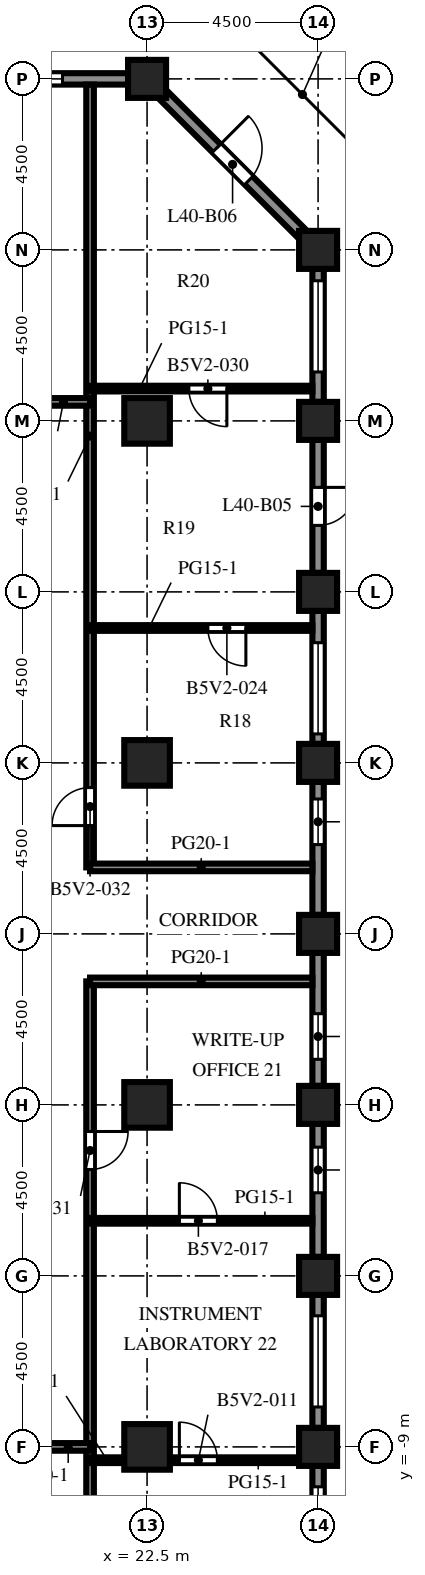
"""IFC4 building model, lengths in metres.
Left out: names, types, materials, properties, quantities, classifications, styles, units other than length and angle.
Written with IfcOpenShell. Run it as: python <this file> out.ifc"""

import sys

from ifc_helpers import new_model, si_unit, direction, frame, frame_2d, origin, origin_2d, place, context, subcontext, project, spatial, rectangle, extrude, element, fill, save


model = new_model("IFC4")
c1 = context("Model", 3, precision=1e-05, world=origin(), true_north=direction((0.0, 1.0)))
c2 = subcontext(c1, "Body", "Model", "MODEL_VIEW")
j1 = project(units=[si_unit("LENGTHUNIT", "METRE"), si_unit("PLANEANGLEUNIT", "RADIAN")], contexts=[c1])
p1 = place(None, origin())
s1 = spatial("IfcSite", under=j1, at=p1, CompositionType="ELEMENT")
p2 = place(p1, origin())
s2 = spatial("IfcBuilding", under=s1, at=p2, CompositionType="ELEMENT")
p3 = place(p2, frame((0.0, 0.0, 177.3)))
s3 = spatial("IfcBuildingStorey", under=s2, at=p3, CompositionType="ELEMENT", Elevation=177.3)
for number, where, z_axis, x_axis in (
    (1, (22.5, 27.0, 0.0), (0.0, 0.0, 1.0), (1.0, 0.0, 0.0)),
    (2, (27.0, -9.0, 0.0), (0.0, 0.0, 1.0), (1.0, 0.0, 0.0)),
    (3, (27.0, -4.5, 0.0), (0.0, 0.0, 1.0), (1.0, 0.0, 0.0)),
    (4, (27.0, 0.0, 0.0), (0.0, 0.0, 1.0), (1.0, 0.0, 0.0)),
    (5, (27.0, 4.5, 0.0), (0.0, 0.0, 1.0), (1.0, 0.0, 0.0)),
    (6, (27.0, 9.0, 0.0), (0.0, 0.0, 1.0), (1.0, 0.0, 0.0)),
    (7, (27.0, 13.5, 0.0), (0.0, 0.0, 1.0), (1.0, 0.0, 0.0)),
    (8, (27.0, 18.0, 0.0), (0.0, 0.0, 1.0), (1.0, 0.0, 0.0)),
    (9, (27.0, 22.5, 0.0), (0.0, 0.0, 1.0), (1.0, 0.0, 0.0)),
):
    element("IfcColumn", number, at=place(p3, frame(where, z_axis=z_axis, x_axis=x_axis)), inside=s3, PredefinedType="COLUMN", context=c2, shape_type="SweptSolid", body=[
        extrude(rectangle(XDim=1.0, YDim=1.0, at=origin_2d()), origin(), (0.0, 0.0, 1.0), 4.1),
    ])
for number, where, z_axis, x_axis in (
    (10, (22.5, -9.0, 0.0), (0.0, 0.0, 1.0), (1.0, 0.0, 0.0)),
    (11, (22.5, 0.0, 0.0), (0.0, 0.0, 1.0), (1.0, 0.0, 0.0)),
    (12, (22.5, 9.0, 0.0), (0.0, 0.0, 1.0), (1.0, 0.0, 0.0)),
    (13, (22.5, 18.0, 0.0), (0.0, 0.0, 1.0), (1.0, 0.0, 0.0)),
):
    element("IfcColumn", number, at=place(p3, frame(where, z_axis=z_axis, x_axis=x_axis)), inside=s3, PredefinedType="COLUMN", context=c2, shape_type="SweptSolid", body=[
        extrude(rectangle(XDim=1.2, YDim=1.2, at=origin_2d()), origin(), (0.0, 0.0, 1.0), 4.1),
    ])
p4 = place(p3, frame((27.0, -9.5, 0.0), z_axis=(0.0, 0.0, 1.0), x_axis=(0.0, -1.0, 0.0)))
e14 = element("IfcWall", 14, at=p4, inside=s3, PredefinedType="SOLIDWALL", context=c2, shape_type="SweptSolid", body=[
    extrude(rectangle(XDim=3.5, YDim=0.3, at=frame_2d((1.75, 0.0))), origin(), (0.0, 0.0, 1.0), 2.85),
])
p5 = place(p4, frame((0.55, 0.0, 0.8)))
e15 = element("IfcOpeningElement", 15, at=p5, cuts=e14, PredefinedType="OPENING", context=c2, shape_type="SweptSolid", body=[
    extrude(rectangle(XDim=2.4, YDim=1.7, at=frame_2d((1.2, 0.85))), frame((0.0, 0.16, 0.0), z_axis=(0.0, -1.0, 0.0), x_axis=(1.0, 0.0, 0.0)), (0.0, 0.0, 1.0), 0.32),
])
p6 = place(p3, frame((27.0, -5.0, 0.0), z_axis=(0.0, 0.0, 1.0), x_axis=(0.0, -1.0, 0.0)))
e16 = element("IfcWall", 16, at=p6, inside=s3, PredefinedType="SOLIDWALL", context=c2, shape_type="SweptSolid", body=[
    extrude(rectangle(XDim=3.5, YDim=0.3, at=frame_2d((1.75, 0.0))), origin(), (0.0, 0.0, 1.0), 2.85),
])
p7 = place(p6, frame((0.55, 0.0, 0.8)))
e17 = element("IfcOpeningElement", 17, at=p7, cuts=e16, PredefinedType="OPENING", context=c2, shape_type="SweptSolid", body=[
    extrude(rectangle(XDim=2.4, YDim=1.7, at=frame_2d((1.2, 0.85))), frame((0.0, 0.16, 0.0), z_axis=(0.0, -1.0, 0.0), x_axis=(1.0, 0.0, 0.0)), (0.0, 0.0, 1.0), 0.32),
])
p8 = place(p3, frame((27.0, -0.5, 0.0), z_axis=(0.0, 0.0, 1.0), x_axis=(0.0, -1.0, 0.0)))
e18 = element("IfcWall", 18, at=p8, inside=s3, PredefinedType="SOLIDWALL", context=c2, shape_type="SweptSolid", body=[
    extrude(rectangle(XDim=3.5, YDim=0.3, at=frame_2d((1.75, 0.0))), origin(), (0.0, 0.0, 1.0), 2.85),
])
p9 = place(p8, frame((0.613, 0.0, 0.8)))
e19 = element("IfcOpeningElement", 19, at=p9, cuts=e18, PredefinedType="OPENING", context=c2, shape_type="SweptSolid", body=[
    extrude(rectangle(XDim=1.2, YDim=1.7, at=frame_2d((0.6, 0.85))), frame((0.0, 0.16, 0.0), z_axis=(0.0, -1.0, 0.0), x_axis=(1.0, 0.0, 0.0)), (0.0, 0.0, 1.0), 0.32),
])
p10 = place(p3, frame((27.0, 4.0, 0.0), z_axis=(0.0, 0.0, 1.0), x_axis=(0.0, -1.0, 0.0)))
e20 = element("IfcWall", 20, at=p10, inside=s3, PredefinedType="SOLIDWALL", context=c2, shape_type="SweptSolid", body=[
    extrude(rectangle(XDim=3.5, YDim=0.3, at=frame_2d((1.75, 0.0))), origin(), (0.0, 0.0, 1.0), 2.85),
])
p11 = place(p10, frame((1.6, 0.0, 0.8)))
e21 = element("IfcOpeningElement", 21, at=p11, cuts=e20, PredefinedType="OPENING", context=c2, shape_type="SweptSolid", body=[
    extrude(rectangle(XDim=1.2, YDim=1.7, at=frame_2d((0.6, 0.85))), frame((0.0, 0.16, 0.0), z_axis=(0.0, -1.0, 0.0), x_axis=(1.0, 0.0, 0.0)), (0.0, 0.0, 1.0), 0.32),
])
p12 = place(p3, frame((27.0, 8.5, 0.0), z_axis=(0.0, 0.0, 1.0), x_axis=(0.0, -1.0, 0.0)))
e22 = element("IfcWall", 22, at=p12, inside=s3, PredefinedType="SOLIDWALL", context=c2, shape_type="SweptSolid", body=[
    extrude(rectangle(XDim=3.5, YDim=0.3, at=frame_2d((1.75, 0.0))), origin(), (0.0, 0.0, 1.0), 2.85),
])
p13 = place(p12, frame((0.45, 0.0, 0.8)))
e23 = element("IfcOpeningElement", 23, at=p13, cuts=e22, PredefinedType="OPENING", context=c2, shape_type="SweptSolid", body=[
    extrude(rectangle(XDim=1.2, YDim=1.7, at=frame_2d((0.6, 0.85))), frame((0.0, 0.16, 0.0), z_axis=(0.0, -1.0, 0.0), x_axis=(1.0, 0.0, 0.0)), (0.0, 0.0, 1.0), 0.32),
])
p14 = place(p3, frame((27.0, 13.0, 0.0), z_axis=(0.0, 0.0, 1.0), x_axis=(0.0, -1.0, 0.0)))
e24 = element("IfcWall", 24, at=p14, inside=s3, PredefinedType="SOLIDWALL", context=c2, shape_type="SweptSolid", body=[
    extrude(rectangle(XDim=3.5, YDim=0.3, at=frame_2d((1.75, 0.0))), origin(), (0.0, 0.0, 1.0), 2.85),
])
p15 = place(p14, frame((0.837, 0.0, 0.8)))
e25 = element("IfcOpeningElement", 25, at=p15, cuts=e24, PredefinedType="OPENING", context=c2, shape_type="SweptSolid", body=[
    extrude(rectangle(XDim=2.4, YDim=1.7, at=frame_2d((1.2, 0.85))), frame((0.0, 0.16, 0.0), z_axis=(0.0, -1.0, 0.0), x_axis=(1.0, 0.0, 0.0)), (0.0, 0.0, 1.0), 0.32),
])
p16 = place(p3, frame((27.0, 17.5, 0.0), z_axis=(0.0, 0.0, 1.0), x_axis=(0.0, -1.0, 0.0)))
e26 = element("IfcWall", 26, at=p16, inside=s3, PredefinedType="SOLIDWALL", context=c2, shape_type="SweptSolid", body=[
    extrude(rectangle(XDim=3.5, YDim=0.3, at=frame_2d((1.75, 0.0))), origin(), (0.0, 0.0, 1.0), 2.85),
])
p17 = place(p16, frame((1.25, 0.0, 0.0)))
e27 = element("IfcOpeningElement", 27, at=p17, cuts=e26, PredefinedType="OPENING", context=c2, shape_type="SweptSolid", body=[
    extrude(rectangle(XDim=1.0, YDim=2.2, at=frame_2d((0.5, 1.1))), frame((0.0, 0.16, 0.0), z_axis=(0.0, -1.0, 0.0), x_axis=(1.0, 0.0, 0.0)), (0.0, 0.0, 1.0), 0.32),
])
p18 = place(p3, frame((27.0, 22.0, 0.0), z_axis=(0.0, 0.0, 1.0), x_axis=(0.0, -1.0, 0.0)))
e28 = element("IfcWall", 28, at=p18, inside=s3, PredefinedType="SOLIDWALL", context=c2, shape_type="SweptSolid", body=[
    extrude(rectangle(XDim=3.5, YDim=0.3, at=frame_2d((1.75, 0.0))), origin(), (0.0, 0.0, 1.0), 2.85),
])
p19 = place(p18, frame((0.312, 0.0, 0.8)))
e29 = element("IfcOpeningElement", 29, at=p19, cuts=e28, PredefinedType="OPENING", context=c2, shape_type="SweptSolid", body=[
    extrude(rectangle(XDim=2.4, YDim=1.7, at=frame_2d((1.2, 0.85))), frame((0.0, 0.16, 0.0), z_axis=(0.0, -1.0, 0.0), x_axis=(1.0, 0.0, 0.0)), (0.0, 0.0, 1.0), 0.32),
])
p20 = place(p3, frame((22.894, 26.606, 0.0), z_axis=(0.0, 0.0, 1.0), x_axis=(0.707106781187, -0.707106781187, 0.0)))
e30 = element("IfcWall", 30, at=p20, inside=s3, PredefinedType="SOLIDWALL", context=c2, shape_type="SweptSolid", body=[
    extrude(rectangle(XDim=5.25, YDim=0.3, at=frame_2d((2.625, 0.0))), origin(), (0.0, 0.0, 1.0), 2.85),
])
p21 = place(p20, frame((2.025, 0.0, 0.0)))
e31 = element("IfcOpeningElement", 31, at=p21, cuts=e30, PredefinedType="OPENING", context=c2, shape_type="SweptSolid", body=[
    extrude(rectangle(XDim=1.2, YDim=2.2, at=frame_2d((0.6, 1.1))), frame((0.0, 0.16, 0.0), z_axis=(0.0, -1.0, 0.0), x_axis=(1.0, 0.0, 0.0)), (0.0, 0.0, 1.0), 0.32),
])
p22 = place(p3, frame((18.5, 27.0, 0.0), z_axis=(0.0, 0.0, 1.0), x_axis=(1.0, 0.0, 0.0)))
e32 = element("IfcWall", 32, at=p22, inside=s3, PredefinedType="SOLIDWALL", context=c2, shape_type="SweptSolid", body=[
    extrude(rectangle(XDim=3.5, YDim=0.3, at=frame_2d((1.75, 0.0))), origin(), (0.0, 0.0, 1.0), 2.85),
])
p23 = place(p22, frame((0.575, 0.0, 0.8)))
e33 = element("IfcOpeningElement", 33, at=p23, cuts=e32, PredefinedType="OPENING", context=c2, shape_type="SweptSolid", body=[
    extrude(rectangle(XDim=1.2, YDim=1.7, at=frame_2d((0.6, 0.85))), frame((0.0, 0.16, 0.0), z_axis=(0.0, -1.0, 0.0), x_axis=(1.0, 0.0, 0.0)), (0.0, 0.0, 1.0), 0.32),
])
p24 = place(p3, frame((21.0, 3.25, 0.0), z_axis=(0.0, 0.0, 1.0), x_axis=(0.0, -1.0, 0.0)))
e34 = element("IfcWall", 34, at=p24, inside=s3, PredefinedType="PARTITIONING", context=c2, shape_type="SweptSolid", body=[
    extrude(rectangle(XDim=30.1, YDim=0.2, at=frame_2d((15.05, 0.0))), origin(), (0.0, 0.0, 1.0), 3.65),
])
p25 = place(p24, frame((3.95, 0.0, 0.0)))
e35 = element("IfcOpeningElement", 35, at=p25, cuts=e34, PredefinedType="OPENING", context=c2, shape_type="SweptSolid", body=[
    extrude(rectangle(XDim=1.0, YDim=2.1, at=frame_2d((0.5, 1.05))), frame((0.0, 0.11, 0.0), z_axis=(0.0, -1.0, 0.0), x_axis=(1.0, 0.0, 0.0)), (0.0, 0.0, 1.0), 0.22),
])
p26 = place(p3, frame((21.0, 26.85, 0.0), z_axis=(0.0, 0.0, 1.0), x_axis=(0.0, -1.0, 0.0)))
e36 = element("IfcWall", 36, at=p26, inside=s3, PredefinedType="PARTITIONING", context=c2, shape_type="SweptSolid", body=[
    extrude(rectangle(XDim=20.6, YDim=0.2, at=frame_2d((10.3, 0.0))), origin(), (0.0, 0.0, 1.0), 3.65),
])
p27 = place(p26, frame((18.5, 0.0, 0.0)))
e37 = element("IfcOpeningElement", 37, at=p27, cuts=e36, PredefinedType="OPENING", context=c2, shape_type="SweptSolid", body=[
    extrude(rectangle(XDim=1.0, YDim=2.1, at=frame_2d((0.5, 1.05))), frame((0.0, 0.11, 0.0), z_axis=(0.0, -1.0, 0.0), x_axis=(1.0, 0.0, 0.0)), (0.0, 0.0, 1.0), 0.22),
])
p28 = place(p3, frame((21.0, -9.35, 0.0), z_axis=(0.0, 0.0, 1.0), x_axis=(1.0, 0.0, 0.0)))
e38 = element("IfcWall", 38, at=p28, inside=s3, PredefinedType="PARTITIONING", context=c2, shape_type="SweptSolid", body=[
    extrude(rectangle(XDim=0.9, YDim=0.15, at=frame_2d((0.45, 0.0))), origin(), (0.0, 0.0, 1.0), 3.65),
])
p29 = place(p3, frame((26.5, -9.35, 0.0), z_axis=(0.0, 0.0, 1.0), x_axis=(-1.0, 0.0, 0.0)))
e39 = element("IfcWall", 39, at=p29, inside=s3, PredefinedType="PARTITIONING", context=c2, shape_type="SweptSolid", body=[
    extrude(rectangle(XDim=3.4, YDim=0.15, at=frame_2d((1.7, 0.0))), origin(), (0.0, 0.0, 1.0), 3.65),
])
p30 = place(p29, frame((2.15, 0.0, 0.0)))
e40 = element("IfcOpeningElement", 40, at=p30, cuts=e39, PredefinedType="OPENING", context=c2, shape_type="SweptSolid", body=[
    extrude(rectangle(XDim=1.0, YDim=2.1, at=frame_2d((0.5, 1.05))), frame((0.0, 0.085, 0.0), z_axis=(0.0, -1.0, 0.0), x_axis=(1.0, 0.0, 0.0)), (0.0, 0.0, 1.0), 0.17),
])
p31 = place(p3, frame((21.0, -9.0, 0.0), z_axis=(0.0, 0.0, 1.0), x_axis=(-1.0, 0.0, 0.0)))
e41 = element("IfcWall", 41, at=p31, inside=s3, PredefinedType="PARTITIONING", context=c2, shape_type="SweptSolid", body=[
    extrude(rectangle(XDim=3.0, YDim=0.2, at=frame_2d((1.5, 0.0))), origin(), (0.0, 0.0, 1.0), 3.65),
])
p32 = place(p31, frame((1.15, 0.0, 0.0)))
e42 = element("IfcOpeningElement", 42, at=p32, cuts=e41, PredefinedType="OPENING", context=c2, shape_type="SweptSolid", body=[
    extrude(rectangle(XDim=1.0, YDim=2.1, at=frame_2d((0.5, 1.05))), frame((0.0, 0.11, 0.0), z_axis=(0.0, -1.0, 0.0), x_axis=(1.0, 0.0, 0.0)), (0.0, 0.0, 1.0), 0.22),
])
p33 = place(p3, frame((26.85, -3.05, 0.0), z_axis=(0.0, 0.0, 1.0), x_axis=(-1.0, 0.0, 0.0)))
e43 = element("IfcWall", 43, at=p33, inside=s3, PredefinedType="PARTITIONING", context=c2, shape_type="SweptSolid", body=[
    extrude(rectangle(XDim=5.85, YDim=0.15, at=frame_2d((2.925, 0.0))), origin(), (0.0, 0.0, 1.0), 3.65),
])
p34 = place(p33, frame((2.5, 0.0, 0.0)))
e44 = element("IfcOpeningElement", 44, at=p34, cuts=e43, PredefinedType="OPENING", context=c2, shape_type="SweptSolid", body=[
    extrude(rectangle(XDim=1.0, YDim=2.1, at=frame_2d((0.5, 1.05))), frame((0.0, 0.085, 0.0), z_axis=(0.0, -1.0, 0.0), x_axis=(1.0, 0.0, 0.0)), (0.0, 0.0, 1.0), 0.17),
])
for number, where, z_axis, x_axis in (
    (45, (21.0, 3.25, 0.0), (0.0, 0.0, 1.0), (1.0, 0.0, 0.0)),
    (46, (21.0, 6.25, 0.0), (0.0, 0.0, 1.0), (1.0, 0.0, 0.0)),
):
    element("IfcWall", number, at=place(p3, frame(where, z_axis=z_axis, x_axis=x_axis)), inside=s3, PredefinedType="PARTITIONING", context=c2, shape_type="SweptSolid", body=[
        extrude(rectangle(XDim=5.85, YDim=0.2, at=frame_2d((2.925, 0.0))), origin(), (0.0, 0.0, 1.0), 3.65),
    ])
p35 = place(p3, frame((21.0, 12.55, 0.0), z_axis=(0.0, 0.0, 1.0), x_axis=(1.0, 0.0, 0.0)))
e47 = element("IfcWall", 47, at=p35, inside=s3, PredefinedType="PARTITIONING", context=c2, shape_type="SweptSolid", body=[
    extrude(rectangle(XDim=5.85, YDim=0.15, at=frame_2d((2.925, 0.0))), origin(), (0.0, 0.0, 1.0), 3.65),
])
p36 = place(p35, frame((3.1, 0.0, 0.0)))
e48 = element("IfcOpeningElement", 48, at=p36, cuts=e47, PredefinedType="OPENING", context=c2, shape_type="SweptSolid", body=[
    extrude(rectangle(XDim=1.0, YDim=2.1, at=frame_2d((0.5, 1.05))), frame((0.0, 0.085, 0.0), z_axis=(0.0, -1.0, 0.0), x_axis=(1.0, 0.0, 0.0)), (0.0, 0.0, 1.0), 0.17),
])
p37 = place(p3, frame((18.0, 18.5, 0.0), z_axis=(0.0, 0.0, 1.0), x_axis=(1.0, 0.0, 0.0)))
e49 = element("IfcWall", 49, at=p37, inside=s3, PredefinedType="PARTITIONING", context=c2, shape_type="SweptSolid", body=[
    extrude(rectangle(XDim=3.0, YDim=0.2, at=frame_2d((1.5, 0.0))), origin(), (0.0, 0.0, 1.0), 3.65),
])
p38 = place(p37, frame((0.6, 0.0, 0.0)))
e50 = element("IfcOpeningElement", 50, at=p38, cuts=e49, PredefinedType="OPENING", context=c2, shape_type="SweptSolid", body=[
    extrude(rectangle(XDim=1.0, YDim=2.1, at=frame_2d((0.5, 1.05))), frame((0.0, 0.11, 0.0), z_axis=(0.0, -1.0, 0.0), x_axis=(1.0, 0.0, 0.0)), (0.0, 0.0, 1.0), 0.22),
])
p39 = place(p3, frame((21.0, 18.85, 0.0), z_axis=(0.0, 0.0, 1.0), x_axis=(1.0, 0.0, 0.0)))
e51 = element("IfcWall", 51, at=p39, inside=s3, PredefinedType="PARTITIONING", context=c2, shape_type="SweptSolid", body=[
    extrude(rectangle(XDim=5.85, YDim=0.15, at=frame_2d((2.925, 0.0))), origin(), (0.0, 0.0, 1.0), 3.65),
])
p40 = place(p39, frame((2.6, 0.0, 0.0)))
e52 = element("IfcOpeningElement", 52, at=p40, cuts=e51, PredefinedType="OPENING", context=c2, shape_type="SweptSolid", body=[
    extrude(rectangle(XDim=1.0, YDim=2.1, at=frame_2d((0.5, 1.05))), frame((0.0, 0.085, 0.0), z_axis=(0.0, -1.0, 0.0), x_axis=(1.0, 0.0, 0.0)), (0.0, 0.0, 1.0), 0.17),
])
p41 = place(p5, origin())
e53 = element("IfcWindow", 53, at=p41, inside=s3, PartitioningType="SINGLE_PANEL", PredefinedType="WINDOW", context=c2, shape_type="SweptSolid", body=[
    extrude(rectangle(XDim=2.4, YDim=1.7, at=frame_2d((1.2, 0.85))), frame((0.0, 0.03, 0.0), z_axis=(0.0, -1.0, 0.0), x_axis=(1.0, 0.0, 0.0)), (0.0, 0.0, 1.0), 0.06),
])
fill(e15, e53)
p42 = place(p7, origin())
e54 = element("IfcWindow", 54, at=p42, inside=s3, PartitioningType="SINGLE_PANEL", PredefinedType="WINDOW", context=c2, shape_type="SweptSolid", body=[
    extrude(rectangle(XDim=2.4, YDim=1.7, at=frame_2d((1.2, 0.85))), frame((0.0, 0.03, 0.0), z_axis=(0.0, -1.0, 0.0), x_axis=(1.0, 0.0, 0.0)), (0.0, 0.0, 1.0), 0.06),
])
fill(e17, e54)
p43 = place(p9, origin())
e55 = element("IfcWindow", 55, at=p43, inside=s3, PartitioningType="SINGLE_PANEL", PredefinedType="WINDOW", context=c2, shape_type="SweptSolid", body=[
    extrude(rectangle(XDim=1.2, YDim=1.7, at=frame_2d((0.6, 0.85))), frame((0.0, 0.03, 0.0), z_axis=(0.0, -1.0, 0.0), x_axis=(1.0, 0.0, 0.0)), (0.0, 0.0, 1.0), 0.06),
])
fill(e19, e55)
p44 = place(p11, origin())
e56 = element("IfcWindow", 56, at=p44, inside=s3, PartitioningType="SINGLE_PANEL", PredefinedType="WINDOW", context=c2, shape_type="SweptSolid", body=[
    extrude(rectangle(XDim=1.2, YDim=1.7, at=frame_2d((0.6, 0.85))), frame((0.0, 0.03, 0.0), z_axis=(0.0, -1.0, 0.0), x_axis=(1.0, 0.0, 0.0)), (0.0, 0.0, 1.0), 0.06),
])
fill(e21, e56)
p45 = place(p13, origin())
e57 = element("IfcWindow", 57, at=p45, inside=s3, PartitioningType="SINGLE_PANEL", PredefinedType="WINDOW", context=c2, shape_type="SweptSolid", body=[
    extrude(rectangle(XDim=1.2, YDim=1.7, at=frame_2d((0.6, 0.85))), frame((0.0, 0.03, 0.0), z_axis=(0.0, -1.0, 0.0), x_axis=(1.0, 0.0, 0.0)), (0.0, 0.0, 1.0), 0.06),
])
fill(e23, e57)
p46 = place(p15, origin())
e58 = element("IfcWindow", 58, at=p46, inside=s3, PartitioningType="SINGLE_PANEL", PredefinedType="WINDOW", context=c2, shape_type="SweptSolid", body=[
    extrude(rectangle(XDim=2.4, YDim=1.7, at=frame_2d((1.2, 0.85))), frame((0.0, 0.03, 0.0), z_axis=(0.0, -1.0, 0.0), x_axis=(1.0, 0.0, 0.0)), (0.0, 0.0, 1.0), 0.06),
])
fill(e25, e58)
p47 = place(p17, origin())
e59 = element("IfcDoor", 59, at=p47, inside=s3, OperationType="SINGLE_SWING_LEFT", PredefinedType="DOOR", context=c2, shape_type="SweptSolid", body=[
    extrude(rectangle(XDim=1.0, YDim=2.2, at=frame_2d((0.5, 1.1))), frame((0.0, 0.025, 0.0), z_axis=(0.0, -1.0, 0.0), x_axis=(1.0, 0.0, 0.0)), (0.0, 0.0, 1.0), 0.05),
])
fill(e27, e59)
p48 = place(p19, origin())
e60 = element("IfcWindow", 60, at=p48, inside=s3, PartitioningType="SINGLE_PANEL", PredefinedType="WINDOW", context=c2, shape_type="SweptSolid", body=[
    extrude(rectangle(XDim=2.4, YDim=1.7, at=frame_2d((1.2, 0.85))), frame((0.0, 0.03, 0.0), z_axis=(0.0, -1.0, 0.0), x_axis=(1.0, 0.0, 0.0)), (0.0, 0.0, 1.0), 0.06),
])
fill(e29, e60)
p49 = place(p21, origin())
e61 = element("IfcDoor", 61, at=p49, inside=s3, OperationType="SINGLE_SWING_LEFT", PredefinedType="DOOR", context=c2, shape_type="SweptSolid", body=[
    extrude(rectangle(XDim=1.2, YDim=2.2, at=frame_2d((0.6, 1.1))), frame((0.0, 0.025, 0.0), z_axis=(0.0, -1.0, 0.0), x_axis=(1.0, 0.0, 0.0)), (0.0, 0.0, 1.0), 0.05),
])
fill(e31, e61)
p50 = place(p23, origin())
e62 = element("IfcWindow", 62, at=p50, inside=s3, PartitioningType="SINGLE_PANEL", PredefinedType="WINDOW", context=c2, shape_type="SweptSolid", body=[
    extrude(rectangle(XDim=1.2, YDim=1.7, at=frame_2d((0.6, 0.85))), frame((0.0, 0.03, 0.0), z_axis=(0.0, -1.0, 0.0), x_axis=(1.0, 0.0, 0.0)), (0.0, 0.0, 1.0), 0.06),
])
fill(e33, e62)
p51 = place(p30, origin())
e63 = element("IfcDoor", 63, at=p51, inside=s3, OperationType="SINGLE_SWING_RIGHT", PredefinedType="DOOR", context=c2, shape_type="SweptSolid", body=[
    extrude(rectangle(XDim=1.0, YDim=2.1, at=frame_2d((0.5, 1.05))), frame((0.0, 0.025, 0.0), z_axis=(0.0, -1.0, 0.0), x_axis=(1.0, 0.0, 0.0)), (0.0, 0.0, 1.0), 0.05),
])
fill(e40, e63)
p52 = place(p34, origin())
e64 = element("IfcDoor", 64, at=p52, inside=s3, OperationType="SINGLE_SWING_RIGHT", PredefinedType="DOOR", context=c2, shape_type="SweptSolid", body=[
    extrude(rectangle(XDim=1.0, YDim=2.1, at=frame_2d((0.5, 1.05))), frame((0.0, 0.025, 0.0), z_axis=(0.0, -1.0, 0.0), x_axis=(1.0, 0.0, 0.0)), (0.0, 0.0, 1.0), 0.05),
])
fill(e44, e64)
p53 = place(p36, origin())
e65 = element("IfcDoor", 65, at=p53, inside=s3, OperationType="SINGLE_SWING_RIGHT", PredefinedType="DOOR", context=c2, shape_type="SweptSolid", body=[
    extrude(rectangle(XDim=1.0, YDim=2.1, at=frame_2d((0.5, 1.05))), frame((0.0, 0.025, 0.0), z_axis=(0.0, -1.0, 0.0), x_axis=(1.0, 0.0, 0.0)), (0.0, 0.0, 1.0), 0.05),
])
fill(e48, e65)
p54 = place(p40, origin())
e66 = element("IfcDoor", 66, at=p54, inside=s3, OperationType="SINGLE_SWING_RIGHT", PredefinedType="DOOR", context=c2, shape_type="SweptSolid", body=[
    extrude(rectangle(XDim=1.0, YDim=2.1, at=frame_2d((0.5, 1.05))), frame((0.0, 0.025, 0.0), z_axis=(0.0, -1.0, 0.0), x_axis=(1.0, 0.0, 0.0)), (0.0, 0.0, 1.0), 0.05),
])
fill(e52, e66)
p55 = place(p25, origin())
e67 = element("IfcDoor", 67, at=p55, inside=s3, OperationType="SINGLE_SWING_LEFT", PredefinedType="DOOR", context=c2, shape_type="SweptSolid", body=[
    extrude(rectangle(XDim=1.0, YDim=2.1, at=frame_2d((0.5, 1.05))), frame((0.0, 0.025, 0.0), z_axis=(0.0, -1.0, 0.0), x_axis=(1.0, 0.0, 0.0)), (0.0, 0.0, 1.0), 0.05),
])
fill(e35, e67)
p56 = place(p27, origin())
e68 = element("IfcDoor", 68, at=p56, inside=s3, OperationType="SINGLE_SWING_RIGHT", PredefinedType="DOOR", context=c2, shape_type="SweptSolid", body=[
    extrude(rectangle(XDim=1.0, YDim=2.1, at=frame_2d((0.5, 1.05))), frame((0.0, 0.025, 0.0), z_axis=(0.0, -1.0, 0.0), x_axis=(1.0, 0.0, 0.0)), (0.0, 0.0, 1.0), 0.05),
])
fill(e37, e68)
save(model, sys.argv[1])
